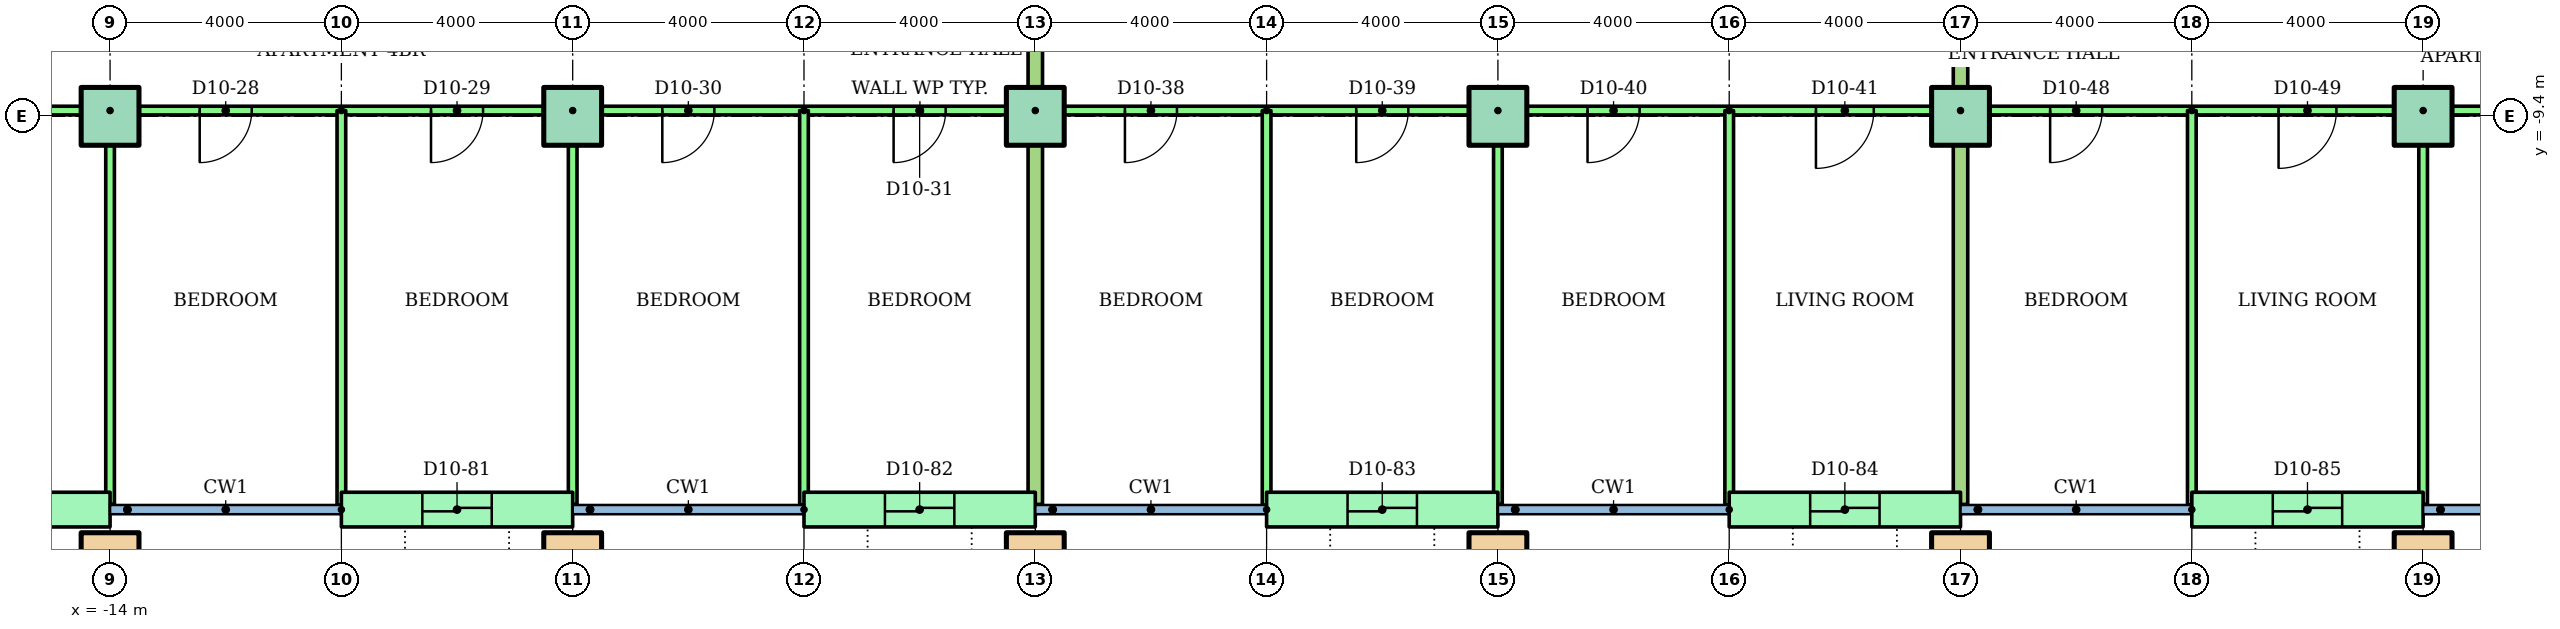
"""IFC4 building model, lengths in metres.
Left out: names, types, materials, properties, quantities, classifications, styles, units other than length and angle.
Written with IfcOpenShell. Run it as: python <this file> out.ifc"""

import sys

from ifc_helpers import new_model, si_unit, direction, frame, frame_2d, origin, origin_2d, place, context, subcontext, project, spatial, rectangle, hollow_rectangle, extrude, element, fill, save


model = new_model("IFC4")
c1 = context("Model", 3, precision=1e-05, world=origin(), true_north=direction((0.0, 1.0)))
c2 = subcontext(c1, "Body", "Model", "MODEL_VIEW")
j1 = project(units=[si_unit("LENGTHUNIT", "METRE"), si_unit("PLANEANGLEUNIT", "RADIAN")], contexts=[c1])
p1 = place(None, origin())
s1 = spatial("IfcSite", under=j1, at=p1, CompositionType="ELEMENT")
p2 = place(p1, origin())
s2 = spatial("IfcBuilding", under=s1, at=p2, CompositionType="ELEMENT")
p3 = place(p2, frame((0.0, 0.0, 41.6)))
s3 = spatial("IfcBuildingStorey", under=s2, at=p3, CompositionType="ELEMENT", Elevation=41.6)
for number, where in (
    (1, (-14.0, -17.1, 0.0)),
    (2, (-6.0, -17.1, 0.0)),
    (3, (2.0, -17.1, 0.0)),
    (4, (10.0, -17.1, 0.0)),
    (5, (18.0, -17.1, 0.0)),
    (6, (26.0, -17.1, 0.0)),
):
    element("IfcColumn", number, at=place(p3, frame(where)), inside=s3, PredefinedType="COLUMN", context=c2, shape_type="SweptSolid", body=[
        extrude(hollow_rectangle(XDim=1.0, YDim=1.0, WallThickness=0.05, at=origin_2d()), origin(), (0.0, 0.0, 1.0), 3.2),
    ])
for number, where in (
    (7, (-14.0, -9.4, 0.0)),
    (8, (-6.0, -9.4, 0.0)),
    (9, (2.0, -9.4, 0.0)),
    (10, (10.0, -9.4, 0.0)),
    (11, (18.0, -9.4, 0.0)),
    (12, (26.0, -9.4, 0.0)),
):
    element("IfcColumn", number, at=place(p3, frame(where)), inside=s3, PredefinedType="COLUMN", context=c2, shape_type="SweptSolid", body=[
        extrude(rectangle(XDim=1.0, YDim=1.0, at=origin_2d()), origin(), (0.0, 0.0, 1.0), 3.2),
    ])
p4 = place(p3, frame((-18.0, -16.2, 0.0)))
e13 = element("IfcWall", 13, at=p4, inside=s3, PredefinedType="STANDARD", context=c2, shape_type="SweptSolid", body=[
    extrude(rectangle(XDim=4.0, YDim=0.6, at=frame_2d((2.0, 0.0))), origin(), (0.0, 0.0, 1.0), 2.92),
])
p5 = place(p4, frame((1.4, 0.0, 0.0)))
e14 = element("IfcOpeningElement", 14, at=p5, cuts=e13, PredefinedType="OPENING", context=c2, shape_type="SweptSolid", body=[
    extrude(rectangle(XDim=1.2, YDim=2.1, at=frame_2d((0.6, 1.05))), frame((0.0, 0.31, 0.0), z_axis=(0.0, -1.0, 0.0), x_axis=(1.0, 0.0, 0.0)), (0.0, 0.0, 1.0), 0.62),
])
p6 = place(p3, frame((-10.0, -16.2, 0.0)))
e15 = element("IfcWall", 15, at=p6, inside=s3, PredefinedType="STANDARD", context=c2, shape_type="SweptSolid", body=[
    extrude(rectangle(XDim=4.0, YDim=0.6, at=frame_2d((2.0, 0.0))), origin(), (0.0, 0.0, 1.0), 2.92),
])
p7 = place(p6, frame((1.4, 0.0, 0.0)))
e16 = element("IfcOpeningElement", 16, at=p7, cuts=e15, PredefinedType="OPENING", context=c2, shape_type="SweptSolid", body=[
    extrude(rectangle(XDim=1.2, YDim=2.1, at=frame_2d((0.6, 1.05))), frame((0.0, 0.31, 0.0), z_axis=(0.0, -1.0, 0.0), x_axis=(1.0, 0.0, 0.0)), (0.0, 0.0, 1.0), 0.62),
])
p8 = place(p3, frame((-2.0, -16.2, 0.0)))
e17 = element("IfcWall", 17, at=p8, inside=s3, PredefinedType="STANDARD", context=c2, shape_type="SweptSolid", body=[
    extrude(rectangle(XDim=4.0, YDim=0.6, at=frame_2d((2.0, 0.0))), origin(), (0.0, 0.0, 1.0), 2.92),
])
p9 = place(p8, frame((1.4, 0.0, 0.0)))
e18 = element("IfcOpeningElement", 18, at=p9, cuts=e17, PredefinedType="OPENING", context=c2, shape_type="SweptSolid", body=[
    extrude(rectangle(XDim=1.2, YDim=2.1, at=frame_2d((0.6, 1.05))), frame((0.0, 0.31, 0.0), z_axis=(0.0, -1.0, 0.0), x_axis=(1.0, 0.0, 0.0)), (0.0, 0.0, 1.0), 0.62),
])
p10 = place(p3, frame((6.0, -16.2, 0.0)))
e19 = element("IfcWall", 19, at=p10, inside=s3, PredefinedType="STANDARD", context=c2, shape_type="SweptSolid", body=[
    extrude(rectangle(XDim=4.0, YDim=0.6, at=frame_2d((2.0, 0.0))), origin(), (0.0, 0.0, 1.0), 2.92),
])
p11 = place(p10, frame((1.4, 0.0, 0.0)))
e20 = element("IfcOpeningElement", 20, at=p11, cuts=e19, PredefinedType="OPENING", context=c2, shape_type="SweptSolid", body=[
    extrude(rectangle(XDim=1.2, YDim=2.1, at=frame_2d((0.6, 1.05))), frame((0.0, 0.31, 0.0), z_axis=(0.0, -1.0, 0.0), x_axis=(1.0, 0.0, 0.0)), (0.0, 0.0, 1.0), 0.62),
])
p12 = place(p3, frame((14.0, -16.2, 0.0)))
e21 = element("IfcWall", 21, at=p12, inside=s3, PredefinedType="STANDARD", context=c2, shape_type="SweptSolid", body=[
    extrude(rectangle(XDim=4.0, YDim=0.6, at=frame_2d((2.0, 0.0))), origin(), (0.0, 0.0, 1.0), 2.92),
])
p13 = place(p12, frame((1.4, 0.0, 0.0)))
e22 = element("IfcOpeningElement", 22, at=p13, cuts=e21, PredefinedType="OPENING", context=c2, shape_type="SweptSolid", body=[
    extrude(rectangle(XDim=1.2, YDim=2.1, at=frame_2d((0.6, 1.05))), frame((0.0, 0.31, 0.0), z_axis=(0.0, -1.0, 0.0), x_axis=(1.0, 0.0, 0.0)), (0.0, 0.0, 1.0), 0.62),
])
p14 = place(p3, frame((22.0, -16.2, 0.0)))
e23 = element("IfcWall", 23, at=p14, inside=s3, PredefinedType="STANDARD", context=c2, shape_type="SweptSolid", body=[
    extrude(rectangle(XDim=4.0, YDim=0.6, at=frame_2d((2.0, 0.0))), origin(), (0.0, 0.0, 1.0), 2.92),
])
p15 = place(p14, frame((1.4, 0.0, 0.0)))
e24 = element("IfcOpeningElement", 24, at=p15, cuts=e23, PredefinedType="OPENING", context=c2, shape_type="SweptSolid", body=[
    extrude(rectangle(XDim=1.2, YDim=2.1, at=frame_2d((0.6, 1.05))), frame((0.0, 0.31, 0.0), z_axis=(0.0, -1.0, 0.0), x_axis=(1.0, 0.0, 0.0)), (0.0, 0.0, 1.0), 0.62),
])
p16 = place(p3, frame((2.0, -9.3, 0.0), z_axis=(0.0, 0.0, 1.0), x_axis=(-1.0, 0.0, 0.0)))
e25 = element("IfcWall", 25, at=p16, inside=s3, PredefinedType="PARTITIONING", context=c2, shape_type="SweptSolid", body=[
    extrude(rectangle(XDim=24.0, YDim=0.15, at=frame_2d((12.0, 0.0))), origin(), (0.0, 0.0, 1.0), 2.4),
])
p17 = place(p16, frame((19.5, 0.0, 0.0)))
e26 = element("IfcOpeningElement", 26, at=p17, cuts=e25, PredefinedType="OPENING", context=c2, shape_type="SweptSolid", body=[
    extrude(rectangle(XDim=1.0, YDim=2.1, at=frame_2d((0.5, 1.05))), frame((0.0, 0.085, 0.0), z_axis=(0.0, -1.0, 0.0), x_axis=(1.0, 0.0, 0.0)), (0.0, 0.0, 1.0), 0.17),
])
p18 = place(p16, frame((13.55, 0.0, 0.0)))
e27 = element("IfcOpeningElement", 27, at=p18, cuts=e25, PredefinedType="OPENING", context=c2, shape_type="SweptSolid", body=[
    extrude(rectangle(XDim=0.9, YDim=2.1, at=frame_2d((0.45, 1.05))), frame((0.0, 0.085, 0.0), z_axis=(0.0, -1.0, 0.0), x_axis=(1.0, 0.0, 0.0)), (0.0, 0.0, 1.0), 0.17),
])
p19 = place(p16, frame((9.55, 0.0, 0.0)))
e28 = element("IfcOpeningElement", 28, at=p19, cuts=e25, PredefinedType="OPENING", context=c2, shape_type="SweptSolid", body=[
    extrude(rectangle(XDim=0.9, YDim=2.1, at=frame_2d((0.45, 1.05))), frame((0.0, 0.085, 0.0), z_axis=(0.0, -1.0, 0.0), x_axis=(1.0, 0.0, 0.0)), (0.0, 0.0, 1.0), 0.17),
])
p20 = place(p16, frame((5.55, 0.0, 0.0)))
e29 = element("IfcOpeningElement", 29, at=p20, cuts=e25, PredefinedType="OPENING", context=c2, shape_type="SweptSolid", body=[
    extrude(rectangle(XDim=0.9, YDim=2.1, at=frame_2d((0.45, 1.05))), frame((0.0, 0.085, 0.0), z_axis=(0.0, -1.0, 0.0), x_axis=(1.0, 0.0, 0.0)), (0.0, 0.0, 1.0), 0.17),
])
p21 = place(p16, frame((1.55, 0.0, 0.0)))
e30 = element("IfcOpeningElement", 30, at=p21, cuts=e25, PredefinedType="OPENING", context=c2, shape_type="SweptSolid", body=[
    extrude(rectangle(XDim=0.9, YDim=2.1, at=frame_2d((0.45, 1.05))), frame((0.0, 0.085, 0.0), z_axis=(0.0, -1.0, 0.0), x_axis=(1.0, 0.0, 0.0)), (0.0, 0.0, 1.0), 0.17),
])
p22 = place(p3, frame((-14.0, -9.3, 0.0), z_axis=(0.0, 0.0, 1.0), x_axis=(0.0, -1.0, 0.0)))
e31 = element("IfcWall", 31, at=p22, inside=s3, PredefinedType="PARTITIONING", context=c2, shape_type="SweptSolid", body=[
    extrude(rectangle(XDim=6.81, YDim=0.15, at=frame_2d((3.405, 0.0))), origin(), (0.0, 0.0, 1.0), 2.4),
])
p23 = place(p3, frame((-10.0, -9.3, 0.0), z_axis=(0.0, 0.0, 1.0), x_axis=(0.0, -1.0, 0.0)))
e32 = element("IfcWall", 32, at=p23, inside=s3, PredefinedType="PARTITIONING", context=c2, shape_type="SweptSolid", body=[
    extrude(rectangle(XDim=6.821, YDim=0.15, at=frame_2d((3.411, 0.0))), origin(), (0.0, 0.0, 1.0), 2.4),
])
p24 = place(p3, frame((-6.0, -9.3, 0.0), z_axis=(0.0, 0.0, 1.0), x_axis=(0.0, -1.0, 0.0)))
e33 = element("IfcWall", 33, at=p24, inside=s3, PredefinedType="PARTITIONING", context=c2, shape_type="SweptSolid", body=[
    extrude(rectangle(XDim=6.81, YDim=0.15, at=frame_2d((3.405, 0.0))), origin(), (0.0, 0.0, 1.0), 2.4),
])
p25 = place(p3, frame((-2.0, -9.3, 0.0), z_axis=(0.0, 0.0, 1.0), x_axis=(0.0, -1.0, 0.0)))
e34 = element("IfcWall", 34, at=p25, inside=s3, PredefinedType="PARTITIONING", context=c2, shape_type="SweptSolid", body=[
    extrude(rectangle(XDim=6.821, YDim=0.15, at=frame_2d((3.411, 0.0))), origin(), (0.0, 0.0, 1.0), 2.4),
])
p26 = place(p3, frame((18.0, -9.3, 0.0), z_axis=(0.0, 0.0, 1.0), x_axis=(-1.0, 0.0, 0.0)))
e35 = element("IfcWall", 35, at=p26, inside=s3, PredefinedType="PARTITIONING", context=c2, shape_type="SweptSolid", body=[
    extrude(rectangle(XDim=16.0, YDim=0.15, at=frame_2d((8.0, 0.0))), origin(), (0.0, 0.0, 1.0), 2.4),
])
p27 = place(p26, frame((13.55, 0.0, 0.0)))
e36 = element("IfcOpeningElement", 36, at=p27, cuts=e35, PredefinedType="OPENING", context=c2, shape_type="SweptSolid", body=[
    extrude(rectangle(XDim=0.9, YDim=2.1, at=frame_2d((0.45, 1.05))), frame((0.0, 0.085, 0.0), z_axis=(0.0, -1.0, 0.0), x_axis=(1.0, 0.0, 0.0)), (0.0, 0.0, 1.0), 0.17),
])
p28 = place(p26, frame((9.55, 0.0, 0.0)))
e37 = element("IfcOpeningElement", 37, at=p28, cuts=e35, PredefinedType="OPENING", context=c2, shape_type="SweptSolid", body=[
    extrude(rectangle(XDim=0.9, YDim=2.1, at=frame_2d((0.45, 1.05))), frame((0.0, 0.085, 0.0), z_axis=(0.0, -1.0, 0.0), x_axis=(1.0, 0.0, 0.0)), (0.0, 0.0, 1.0), 0.17),
])
p29 = place(p26, frame((5.55, 0.0, 0.0)))
e38 = element("IfcOpeningElement", 38, at=p29, cuts=e35, PredefinedType="OPENING", context=c2, shape_type="SweptSolid", body=[
    extrude(rectangle(XDim=0.9, YDim=2.1, at=frame_2d((0.45, 1.05))), frame((0.0, 0.085, 0.0), z_axis=(0.0, -1.0, 0.0), x_axis=(1.0, 0.0, 0.0)), (0.0, 0.0, 1.0), 0.17),
])
p30 = place(p26, frame((1.5, 0.0, 0.0)))
e39 = element("IfcOpeningElement", 39, at=p30, cuts=e35, PredefinedType="OPENING", context=c2, shape_type="SweptSolid", body=[
    extrude(rectangle(XDim=1.0, YDim=2.1, at=frame_2d((0.5, 1.05))), frame((0.0, 0.085, 0.0), z_axis=(0.0, -1.0, 0.0), x_axis=(1.0, 0.0, 0.0)), (0.0, 0.0, 1.0), 0.17),
])
p31 = place(p3, frame((6.0, -9.3, 0.0), z_axis=(0.0, 0.0, 1.0), x_axis=(0.0, -1.0, 0.0)))
e40 = element("IfcWall", 40, at=p31, inside=s3, PredefinedType="PARTITIONING", context=c2, shape_type="SweptSolid", body=[
    extrude(rectangle(XDim=6.821, YDim=0.15, at=frame_2d((3.411, 0.0))), origin(), (0.0, 0.0, 1.0), 2.4),
])
p32 = place(p3, frame((10.0, -9.3, 0.0), z_axis=(0.0, 0.0, 1.0), x_axis=(0.0, -1.0, 0.0)))
e41 = element("IfcWall", 41, at=p32, inside=s3, PredefinedType="PARTITIONING", context=c2, shape_type="SweptSolid", body=[
    extrude(rectangle(XDim=6.81, YDim=0.15, at=frame_2d((3.405, 0.0))), origin(), (0.0, 0.0, 1.0), 2.4),
])
p33 = place(p3, frame((14.0, -9.3, 0.0), z_axis=(0.0, 0.0, 1.0), x_axis=(0.0, -1.0, 0.0)))
e42 = element("IfcWall", 42, at=p33, inside=s3, PredefinedType="PARTITIONING", context=c2, shape_type="SweptSolid", body=[
    extrude(rectangle(XDim=6.821, YDim=0.15, at=frame_2d((3.411, 0.0))), origin(), (0.0, 0.0, 1.0), 2.4),
])
p34 = place(p3, frame((2.0, -1.4, 0.0), z_axis=(0.0, 0.0, 1.0), x_axis=(0.0, -1.0, 0.0)))
e43 = element("IfcWall", 43, at=p34, inside=s3, PredefinedType="PARTITIONING", context=c2, shape_type="SweptSolid", body=[
    extrude(rectangle(XDim=14.71, YDim=0.25, at=frame_2d((7.355, 0.0))), origin(), (0.0, 0.0, 1.0), 2.4),
])
p35 = place(p3, frame((36.52, -9.3, 0.0), z_axis=(0.0, 0.0, 1.0), x_axis=(-1.0, 0.0, 0.0)))
e44 = element("IfcWall", 44, at=p35, inside=s3, PredefinedType="PARTITIONING", context=c2, shape_type="SweptSolid", body=[
    extrude(rectangle(XDim=18.52, YDim=0.15, at=frame_2d((9.26, 0.0))), origin(), (0.0, 0.0, 1.0), 2.4),
])
p36 = place(p35, frame((16.07, 0.0, 0.0)))
e45 = element("IfcOpeningElement", 45, at=p36, cuts=e44, PredefinedType="OPENING", context=c2, shape_type="SweptSolid", body=[
    extrude(rectangle(XDim=0.9, YDim=2.1, at=frame_2d((0.45, 1.05))), frame((0.0, 0.085, 0.0), z_axis=(0.0, -1.0, 0.0), x_axis=(1.0, 0.0, 0.0)), (0.0, 0.0, 1.0), 0.17),
])
p37 = place(p35, frame((12.02, 0.0, 0.0)))
e46 = element("IfcOpeningElement", 46, at=p37, cuts=e44, PredefinedType="OPENING", context=c2, shape_type="SweptSolid", body=[
    extrude(rectangle(XDim=1.0, YDim=2.1, at=frame_2d((0.5, 1.05))), frame((0.0, 0.085, 0.0), z_axis=(0.0, -1.0, 0.0), x_axis=(1.0, 0.0, 0.0)), (0.0, 0.0, 1.0), 0.17),
])
p38 = place(p35, frame((7.17, 0.0, 0.0)))
e47 = element("IfcOpeningElement", 47, at=p38, cuts=e44, PredefinedType="OPENING", context=c2, shape_type="SweptSolid", body=[
    extrude(rectangle(XDim=0.9, YDim=2.1, at=frame_2d((0.45, 1.05))), frame((0.0, 0.085, 0.0), z_axis=(0.0, -1.0, 0.0), x_axis=(1.0, 0.0, 0.0)), (0.0, 0.0, 1.0), 0.17),
])
p39 = place(p35, frame((0.86, 0.0, 0.0)))
e48 = element("IfcOpeningElement", 48, at=p39, cuts=e44, PredefinedType="OPENING", context=c2, shape_type="SweptSolid", body=[
    extrude(rectangle(XDim=0.9, YDim=2.1, at=frame_2d((0.45, 1.05))), frame((0.0, 0.085, 0.0), z_axis=(0.0, -1.0, 0.0), x_axis=(1.0, 0.0, 0.0)), (0.0, 0.0, 1.0), 0.17),
])
p40 = place(p3, frame((22.0, -9.3, 0.0), z_axis=(0.0, 0.0, 1.0), x_axis=(0.0, -1.0, 0.0)))
e49 = element("IfcWall", 49, at=p40, inside=s3, PredefinedType="PARTITIONING", context=c2, shape_type="SweptSolid", body=[
    extrude(rectangle(XDim=6.821, YDim=0.15, at=frame_2d((3.411, 0.0))), origin(), (0.0, 0.0, 1.0), 2.4),
])
p41 = place(p3, frame((26.0, -9.3, 0.0), z_axis=(0.0, 0.0, 1.0), x_axis=(0.0, -1.0, 0.0)))
e50 = element("IfcWall", 50, at=p41, inside=s3, PredefinedType="PARTITIONING", context=c2, shape_type="SweptSolid", body=[
    extrude(rectangle(XDim=6.81, YDim=0.15, at=frame_2d((3.405, 0.0))), origin(), (0.0, 0.0, 1.0), 2.4),
])
p42 = place(p3, frame((18.0, -1.4, 0.0), z_axis=(0.0, 0.0, 1.0), x_axis=(0.0, -1.0, 0.0)))
e51 = element("IfcWall", 51, at=p42, inside=s3, PredefinedType="PARTITIONING", context=c2, shape_type="SweptSolid", body=[
    extrude(rectangle(XDim=14.71, YDim=0.25, at=frame_2d((7.355, 0.0))), origin(), (0.0, 0.0, 1.0), 2.4),
])
p43 = place(p18, origin())
e52 = element("IfcDoor", 52, at=p43, inside=s3, OperationType="SINGLE_SWING_RIGHT", PredefinedType="DOOR", context=c2, shape_type="SweptSolid", body=[
    extrude(rectangle(XDim=0.9, YDim=2.1, at=frame_2d((0.45, 1.05))), frame((0.0, 0.025, 0.0), z_axis=(0.0, -1.0, 0.0), x_axis=(1.0, 0.0, 0.0)), (0.0, 0.0, 1.0), 0.05),
])
fill(e27, e52)
p44 = place(p19, origin())
e53 = element("IfcDoor", 53, at=p44, inside=s3, OperationType="SINGLE_SWING_RIGHT", PredefinedType="DOOR", context=c2, shape_type="SweptSolid", body=[
    extrude(rectangle(XDim=0.9, YDim=2.1, at=frame_2d((0.45, 1.05))), frame((0.0, 0.025, 0.0), z_axis=(0.0, -1.0, 0.0), x_axis=(1.0, 0.0, 0.0)), (0.0, 0.0, 1.0), 0.05),
])
fill(e28, e53)
p45 = place(p20, origin())
e54 = element("IfcDoor", 54, at=p45, inside=s3, OperationType="SINGLE_SWING_RIGHT", PredefinedType="DOOR", context=c2, shape_type="SweptSolid", body=[
    extrude(rectangle(XDim=0.9, YDim=2.1, at=frame_2d((0.45, 1.05))), frame((0.0, 0.025, 0.0), z_axis=(0.0, -1.0, 0.0), x_axis=(1.0, 0.0, 0.0)), (0.0, 0.0, 1.0), 0.05),
])
fill(e29, e54)
p46 = place(p21, origin())
e55 = element("IfcDoor", 55, at=p46, inside=s3, OperationType="SINGLE_SWING_RIGHT", PredefinedType="DOOR", context=c2, shape_type="SweptSolid", body=[
    extrude(rectangle(XDim=0.9, YDim=2.1, at=frame_2d((0.45, 1.05))), frame((0.0, 0.025, 0.0), z_axis=(0.0, -1.0, 0.0), x_axis=(1.0, 0.0, 0.0)), (0.0, 0.0, 1.0), 0.05),
])
fill(e30, e55)
p47 = place(p27, origin())
e56 = element("IfcDoor", 56, at=p47, inside=s3, OperationType="SINGLE_SWING_RIGHT", PredefinedType="DOOR", context=c2, shape_type="SweptSolid", body=[
    extrude(rectangle(XDim=0.9, YDim=2.1, at=frame_2d((0.45, 1.05))), frame((0.0, 0.025, 0.0), z_axis=(0.0, -1.0, 0.0), x_axis=(1.0, 0.0, 0.0)), (0.0, 0.0, 1.0), 0.05),
])
fill(e36, e56)
p48 = place(p28, origin())
e57 = element("IfcDoor", 57, at=p48, inside=s3, OperationType="SINGLE_SWING_RIGHT", PredefinedType="DOOR", context=c2, shape_type="SweptSolid", body=[
    extrude(rectangle(XDim=0.9, YDim=2.1, at=frame_2d((0.45, 1.05))), frame((0.0, 0.025, 0.0), z_axis=(0.0, -1.0, 0.0), x_axis=(1.0, 0.0, 0.0)), (0.0, 0.0, 1.0), 0.05),
])
fill(e37, e57)
p49 = place(p29, origin())
e58 = element("IfcDoor", 58, at=p49, inside=s3, OperationType="SINGLE_SWING_RIGHT", PredefinedType="DOOR", context=c2, shape_type="SweptSolid", body=[
    extrude(rectangle(XDim=0.9, YDim=2.1, at=frame_2d((0.45, 1.05))), frame((0.0, 0.025, 0.0), z_axis=(0.0, -1.0, 0.0), x_axis=(1.0, 0.0, 0.0)), (0.0, 0.0, 1.0), 0.05),
])
fill(e38, e58)
p50 = place(p30, origin())
e59 = element("IfcDoor", 59, at=p50, inside=s3, OperationType="SINGLE_SWING_RIGHT", PredefinedType="DOOR", context=c2, shape_type="SweptSolid", body=[
    extrude(rectangle(XDim=1.0, YDim=2.1, at=frame_2d((0.5, 1.05))), frame((0.0, 0.025, 0.0), z_axis=(0.0, -1.0, 0.0), x_axis=(1.0, 0.0, 0.0)), (0.0, 0.0, 1.0), 0.05),
])
fill(e39, e59)
p51 = place(p36, origin())
e60 = element("IfcDoor", 60, at=p51, inside=s3, OperationType="SINGLE_SWING_RIGHT", PredefinedType="DOOR", context=c2, shape_type="SweptSolid", body=[
    extrude(rectangle(XDim=0.9, YDim=2.1, at=frame_2d((0.45, 1.05))), frame((0.0, 0.025, 0.0), z_axis=(0.0, -1.0, 0.0), x_axis=(1.0, 0.0, 0.0)), (0.0, 0.0, 1.0), 0.05),
])
fill(e45, e60)
p52 = place(p37, origin())
e61 = element("IfcDoor", 61, at=p52, inside=s3, OperationType="SINGLE_SWING_RIGHT", PredefinedType="DOOR", context=c2, shape_type="SweptSolid", body=[
    extrude(rectangle(XDim=1.0, YDim=2.1, at=frame_2d((0.5, 1.05))), frame((0.0, 0.025, 0.0), z_axis=(0.0, -1.0, 0.0), x_axis=(1.0, 0.0, 0.0)), (0.0, 0.0, 1.0), 0.05),
])
fill(e46, e61)
p53 = place(p7, origin())
e62 = element("IfcDoor", 62, at=p53, inside=s3, OperationType="SLIDING_TO_LEFT", PredefinedType="DOOR", context=c2, shape_type="SweptSolid", body=[
    extrude(rectangle(XDim=1.2, YDim=2.1, at=frame_2d((0.6, 1.05))), frame((0.0, 0.025, 0.0), z_axis=(0.0, -1.0, 0.0), x_axis=(1.0, 0.0, 0.0)), (0.0, 0.0, 1.0), 0.05),
])
fill(e16, e62)
p54 = place(p9, origin())
e63 = element("IfcDoor", 63, at=p54, inside=s3, OperationType="SLIDING_TO_LEFT", PredefinedType="DOOR", context=c2, shape_type="SweptSolid", body=[
    extrude(rectangle(XDim=1.2, YDim=2.1, at=frame_2d((0.6, 1.05))), frame((0.0, 0.025, 0.0), z_axis=(0.0, -1.0, 0.0), x_axis=(1.0, 0.0, 0.0)), (0.0, 0.0, 1.0), 0.05),
])
fill(e18, e63)
p55 = place(p11, origin())
e64 = element("IfcDoor", 64, at=p55, inside=s3, OperationType="SLIDING_TO_LEFT", PredefinedType="DOOR", context=c2, shape_type="SweptSolid", body=[
    extrude(rectangle(XDim=1.2, YDim=2.1, at=frame_2d((0.6, 1.05))), frame((0.0, 0.025, 0.0), z_axis=(0.0, -1.0, 0.0), x_axis=(1.0, 0.0, 0.0)), (0.0, 0.0, 1.0), 0.05),
])
fill(e20, e64)
p56 = place(p13, origin())
e65 = element("IfcDoor", 65, at=p56, inside=s3, OperationType="SLIDING_TO_LEFT", PredefinedType="DOOR", context=c2, shape_type="SweptSolid", body=[
    extrude(rectangle(XDim=1.2, YDim=2.1, at=frame_2d((0.6, 1.05))), frame((0.0, 0.025, 0.0), z_axis=(0.0, -1.0, 0.0), x_axis=(1.0, 0.0, 0.0)), (0.0, 0.0, 1.0), 0.05),
])
fill(e22, e65)
p57 = place(p15, origin())
e66 = element("IfcDoor", 66, at=p57, inside=s3, OperationType="SLIDING_TO_LEFT", PredefinedType="DOOR", context=c2, shape_type="SweptSolid", body=[
    extrude(rectangle(XDim=1.2, YDim=2.1, at=frame_2d((0.6, 1.05))), frame((0.0, 0.025, 0.0), z_axis=(0.0, -1.0, 0.0), x_axis=(1.0, 0.0, 0.0)), (0.0, 0.0, 1.0), 0.05),
])
fill(e24, e66)
save(model, sys.argv[1])
